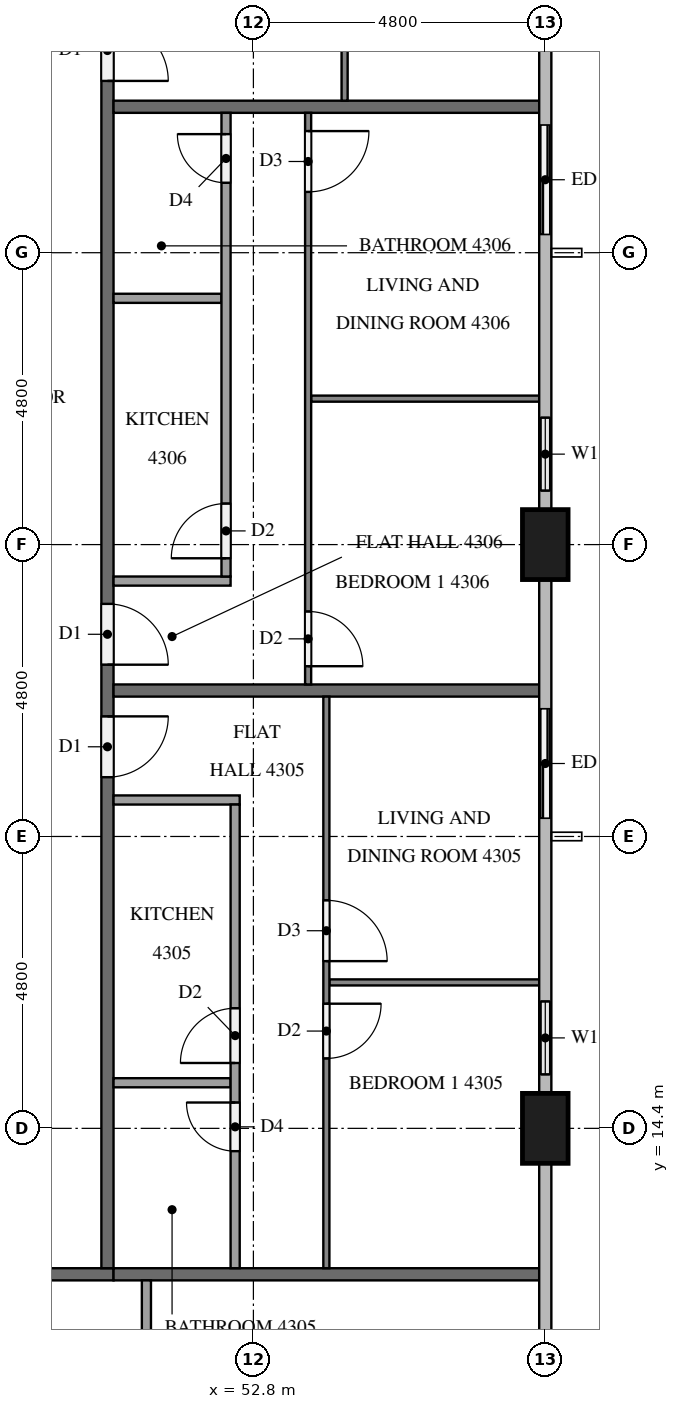
"""IFC4 building model, lengths in metres.
Left out: names, types, materials, properties, quantities, classifications, styles, units other than length and angle.
Written with IfcOpenShell. Run it as: python <this file> out.ifc"""

import sys

from ifc_helpers import new_model, si_unit, direction, frame, frame_2d, origin, origin_2d, place, context, subcontext, project, spatial, rectangle, extrude, element, fill, save


model = new_model("IFC4")
c1 = context("Model", 3, precision=1e-05, world=origin(), true_north=direction((0.0, 1.0)))
c2 = subcontext(c1, "Body", "Model", "MODEL_VIEW")
j1 = project(units=[si_unit("LENGTHUNIT", "METRE"), si_unit("PLANEANGLEUNIT", "RADIAN")], contexts=[c1])
p1 = place(None, origin())
s1 = spatial("IfcSite", under=j1, at=p1, CompositionType="ELEMENT")
p2 = place(p1, origin())
s2 = spatial("IfcBuilding", under=s1, at=p2, CompositionType="ELEMENT")
p3 = place(p2, frame((0.0, 0.0, 166.5)))
s3 = spatial("IfcBuildingStorey", under=s2, at=p3, CompositionType="ELEMENT", Elevation=166.5)
for number, where, z_axis, x_axis in (
    (1, (57.6, 14.4, 0.0), (0.0, 0.0, 1.0), (0.0, 1.0, 0.0)),
    (2, (57.6, 24.0, 0.0), (0.0, 0.0, 1.0), (0.0, 1.0, 0.0)),
):
    element("IfcColumn", number, at=place(p3, frame(where, z_axis=z_axis, x_axis=x_axis)), inside=s3, PredefinedType="COLUMN", context=c2, shape_type="SweptSolid", body=[
        extrude(rectangle(XDim=1.15, YDim=0.75, at=origin_2d()), origin(), (0.0, 0.0, 1.0), 3.2),
    ])
p4 = place(p3, frame((57.6, 14.975, 0.0), z_axis=(0.0, 0.0, 1.0), x_axis=(0.0, 1.0, 0.0)))
e3 = element("IfcWall", 3, at=p4, inside=s3, PredefinedType="SOLIDWALL", context=c2, shape_type="SweptSolid", body=[
    extrude(rectangle(XDim=1.825, YDim=0.15, at=frame_2d((0.913, 0.0))), origin(), (0.0, 0.0, 1.0), 3.2),
])
p5 = place(p4, frame((0.312, 0.0, 0.9)))
e4 = element("IfcOpeningElement", 4, at=p5, cuts=e3, PredefinedType="OPENING", context=c2, shape_type="SweptSolid", body=[
    extrude(rectangle(XDim=1.2, YDim=1.4, at=frame_2d((0.6, 0.7))), frame((0.0, 0.085, 0.0), z_axis=(0.0, -1.0, 0.0), x_axis=(1.0, 0.0, 0.0)), (0.0, 0.0, 1.0), 0.17),
])
p6 = place(p3, frame((57.6, 19.2, 0.0), z_axis=(0.0, 0.0, 1.0), x_axis=(0.0, 1.0, 0.0)))
e5 = element("IfcWall", 5, at=p6, inside=s3, PredefinedType="SOLIDWALL", context=c2, shape_type="SweptSolid", body=[
    extrude(rectangle(XDim=2.4, YDim=0.15, at=frame_2d((1.2, 0.0))), origin(), (0.0, 0.0, 1.0), 3.2),
])
p7 = place(p6, frame((0.3, 0.0, 0.0)))
e6 = element("IfcOpeningElement", 6, at=p7, cuts=e5, PredefinedType="OPENING", context=c2, shape_type="SweptSolid", body=[
    extrude(rectangle(XDim=1.8, YDim=2.4, at=frame_2d((0.9, 1.2))), frame((0.0, 0.085, 0.0), z_axis=(0.0, -1.0, 0.0), x_axis=(1.0, 0.0, 0.0)), (0.0, 0.0, 1.0), 0.17),
])
p8 = place(p3, frame((57.6, 24.575, 0.0), z_axis=(0.0, 0.0, 1.0), x_axis=(0.0, 1.0, 0.0)))
e7 = element("IfcWall", 7, at=p8, inside=s3, PredefinedType="SOLIDWALL", context=c2, shape_type="SweptSolid", body=[
    extrude(rectangle(XDim=1.825, YDim=0.15, at=frame_2d((0.913, 0.0))), origin(), (0.0, 0.0, 1.0), 3.2),
])
p9 = place(p8, frame((0.312, 0.0, 0.9)))
e8 = element("IfcOpeningElement", 8, at=p9, cuts=e7, PredefinedType="OPENING", context=c2, shape_type="SweptSolid", body=[
    extrude(rectangle(XDim=1.2, YDim=1.4, at=frame_2d((0.6, 0.7))), frame((0.0, 0.085, 0.0), z_axis=(0.0, -1.0, 0.0), x_axis=(1.0, 0.0, 0.0)), (0.0, 0.0, 1.0), 0.17),
])
p10 = place(p3, frame((57.6, 28.8, 0.0), z_axis=(0.0, 0.0, 1.0), x_axis=(0.0, 1.0, 0.0)))
e9 = element("IfcWall", 9, at=p10, inside=s3, PredefinedType="SOLIDWALL", context=c2, shape_type="SweptSolid", body=[
    extrude(rectangle(XDim=2.4, YDim=0.15, at=frame_2d((1.2, 0.0))), origin(), (0.0, 0.0, 1.0), 3.2),
])
p11 = place(p10, frame((0.3, 0.0, 0.0)))
e10 = element("IfcOpeningElement", 10, at=p11, cuts=e9, PredefinedType="OPENING", context=c2, shape_type="SweptSolid", body=[
    extrude(rectangle(XDim=1.8, YDim=2.4, at=frame_2d((0.9, 1.2))), frame((0.0, 0.085, 0.0), z_axis=(0.0, -1.0, 0.0), x_axis=(1.0, 0.0, 0.0)), (0.0, 0.0, 1.0), 0.17),
])
p12 = place(p3, frame((50.5, 12.0, 0.0), z_axis=(0.0, 0.0, 1.0), x_axis=(-1.0, 0.0, 0.0)))
e11 = element("IfcWall", 11, at=p12, inside=s3, PredefinedType="PARTITIONING", context=c2, shape_type="SweptSolid", body=[
    extrude(rectangle(XDim=38.6, YDim=0.2, at=frame_2d((19.3, 0.0))), origin(), (0.0, 0.0, 1.0), 3.2),
])
p13 = place(p12, frame((34.125, 0.0, 0.0)))
e12 = element("IfcOpeningElement", 12, at=p13, cuts=e11, PredefinedType="OPENING", context=c2, shape_type="SweptSolid", body=[
    extrude(rectangle(XDim=1.0, YDim=2.1, at=frame_2d((0.5, 1.05))), frame((0.0, 0.11, 0.0), z_axis=(0.0, -1.0, 0.0), x_axis=(1.0, 0.0, 0.0)), (0.0, 0.0, 1.0), 0.22),
])
p14 = place(p12, frame((32.275, 0.0, 0.0)))
e13 = element("IfcOpeningElement", 13, at=p14, cuts=e11, PredefinedType="OPENING", context=c2, shape_type="SweptSolid", body=[
    extrude(rectangle(XDim=1.0, YDim=2.1, at=frame_2d((0.5, 1.05))), frame((0.0, 0.11, 0.0), z_axis=(0.0, -1.0, 0.0), x_axis=(1.0, 0.0, 0.0)), (0.0, 0.0, 1.0), 0.22),
])
p15 = place(p12, frame((12.525, 0.0, 0.0)))
e14 = element("IfcOpeningElement", 14, at=p15, cuts=e11, PredefinedType="OPENING", context=c2, shape_type="SweptSolid", body=[
    extrude(rectangle(XDim=1.0, YDim=2.1, at=frame_2d((0.5, 1.05))), frame((0.0, 0.11, 0.0), z_axis=(0.0, -1.0, 0.0), x_axis=(1.0, 0.0, 0.0)), (0.0, 0.0, 1.0), 0.22),
])
p16 = place(p12, frame((10.625, 0.0, 0.0)))
e15 = element("IfcOpeningElement", 15, at=p16, cuts=e11, PredefinedType="OPENING", context=c2, shape_type="SweptSolid", body=[
    extrude(rectangle(XDim=1.1, YDim=2.1, at=frame_2d((0.55, 1.05))), frame((0.0, 0.11, 0.0), z_axis=(0.0, -1.0, 0.0), x_axis=(1.0, 0.0, 0.0)), (0.0, 0.0, 1.0), 0.22),
])
p17 = place(p3, frame((50.4, 40.7, 0.0), z_axis=(0.0, 0.0, 1.0), x_axis=(0.0, -1.0, 0.0)))
e16 = element("IfcWall", 16, at=p17, inside=s3, PredefinedType="PARTITIONING", context=c2, shape_type="SweptSolid", body=[
    extrude(rectangle(XDim=28.6, YDim=0.2, at=frame_2d((14.3, 0.0))), origin(), (0.0, 0.0, 1.0), 3.2),
])
p18 = place(p17, frame((19.525, 0.0, 0.0)))
e17 = element("IfcOpeningElement", 17, at=p18, cuts=e16, PredefinedType="OPENING", context=c2, shape_type="SweptSolid", body=[
    extrude(rectangle(XDim=1.0, YDim=2.1, at=frame_2d((0.5, 1.05))), frame((0.0, 0.11, 0.0), z_axis=(0.0, -1.0, 0.0), x_axis=(1.0, 0.0, 0.0)), (0.0, 0.0, 1.0), 0.22),
])
p19 = place(p17, frame((17.675, 0.0, 0.0)))
e18 = element("IfcOpeningElement", 18, at=p19, cuts=e16, PredefinedType="OPENING", context=c2, shape_type="SweptSolid", body=[
    extrude(rectangle(XDim=1.0, YDim=2.1, at=frame_2d((0.5, 1.05))), frame((0.0, 0.11, 0.0), z_axis=(0.0, -1.0, 0.0), x_axis=(1.0, 0.0, 0.0)), (0.0, 0.0, 1.0), 0.22),
])
p20 = place(p17, frame((8.075, 0.0, 0.0)))
e19 = element("IfcOpeningElement", 19, at=p20, cuts=e16, PredefinedType="OPENING", context=c2, shape_type="SweptSolid", body=[
    extrude(rectangle(XDim=1.0, YDim=2.1, at=frame_2d((0.5, 1.05))), frame((0.0, 0.11, 0.0), z_axis=(0.0, -1.0, 0.0), x_axis=(1.0, 0.0, 0.0)), (0.0, 0.0, 1.0), 0.22),
])
for number, where, z_axis, x_axis in (
    (20, (50.5, 12.0, 0.0), (0.0, 0.0, 1.0), (1.0, 0.0, 0.0)),
    (21, (50.5, 21.6, 0.0), (0.0, 0.0, 1.0), (1.0, 0.0, 0.0)),
    (22, (50.5, 31.2, 0.0), (0.0, 0.0, 1.0), (1.0, 0.0, 0.0)),
):
    element("IfcWall", number, at=place(p3, frame(where, z_axis=z_axis, x_axis=x_axis)), inside=s3, PredefinedType="PARTITIONING", context=c2, shape_type="SweptSolid", body=[
        extrude(rectangle(XDim=7.0, YDim=0.2, at=frame_2d((3.5, 0.0))), origin(), (0.0, 0.0, 1.0), 3.2),
    ])
p21 = place(p3, frame((51.041, 11.9, 0.0), z_axis=(0.0, 0.0, 1.0), x_axis=(0.0, -1.0, 0.0)))
e23 = element("IfcWall", 23, at=p21, inside=s3, PredefinedType="PARTITIONING", context=c2, shape_type="SweptSolid", body=[
    extrude(rectangle(XDim=4.175, YDim=0.15, at=frame_2d((2.087, 0.0))), origin(), (0.0, 0.0, 1.0), 3.2),
])
p22 = place(p3, frame((54.05, 16.8, 0.0), z_axis=(0.0, 0.0, 1.0), x_axis=(1.0, 0.0, 0.0)))
e24 = element("IfcWall", 24, at=p22, inside=s3, PredefinedType="PARTITIONING", context=c2, shape_type="SweptSolid", body=[
    extrude(rectangle(XDim=3.45, YDim=0.1, at=frame_2d((1.725, 0.0))), origin(), (0.0, 0.0, 1.0), 3.2),
])
p23 = place(p3, frame((54.0, 21.5, 0.0), z_axis=(0.0, 0.0, 1.0), x_axis=(0.0, -1.0, 0.0)))
e25 = element("IfcWall", 25, at=p23, inside=s3, PredefinedType="PARTITIONING", context=c2, shape_type="SweptSolid", body=[
    extrude(rectangle(XDim=9.4, YDim=0.1, at=frame_2d((4.7, 0.0))), origin(), (0.0, 0.0, 1.0), 3.2),
])
p24 = place(p23, frame((3.35, 0.0, 0.0)))
e26 = element("IfcOpeningElement", 26, at=p24, cuts=e25, PredefinedType="OPENING", context=c2, shape_type="SweptSolid", body=[
    extrude(rectangle(XDim=1.0, YDim=2.1, at=frame_2d((0.5, 1.05))), frame((0.0, 0.06, 0.0), z_axis=(0.0, -1.0, 0.0), x_axis=(1.0, 0.0, 0.0)), (0.0, 0.0, 1.0), 0.12),
])
p25 = place(p23, frame((5.05, 0.0, 0.0)))
e27 = element("IfcOpeningElement", 27, at=p25, cuts=e25, PredefinedType="OPENING", context=c2, shape_type="SweptSolid", body=[
    extrude(rectangle(XDim=0.9, YDim=2.1, at=frame_2d((0.45, 1.05))), frame((0.0, 0.06, 0.0), z_axis=(0.0, -1.0, 0.0), x_axis=(1.0, 0.0, 0.0)), (0.0, 0.0, 1.0), 0.12),
])
p26 = place(p3, frame((50.5, 15.15, 0.0), z_axis=(0.0, 0.0, 1.0), x_axis=(1.0, 0.0, 0.0)))
e28 = element("IfcWall", 28, at=p26, inside=s3, PredefinedType="PARTITIONING", context=c2, shape_type="SweptSolid", body=[
    extrude(rectangle(XDim=1.925, YDim=0.15, at=frame_2d((0.962, 0.0))), origin(), (0.0, 0.0, 1.0), 3.2),
])
p27 = place(p3, frame((50.5, 19.8, 0.0), z_axis=(0.0, 0.0, 1.0), x_axis=(1.0, 0.0, 0.0)))
e29 = element("IfcWall", 29, at=p27, inside=s3, PredefinedType="PARTITIONING", context=c2, shape_type="SweptSolid", body=[
    extrude(rectangle(XDim=2.075, YDim=0.15, at=frame_2d((1.038, 0.0))), origin(), (0.0, 0.0, 1.0), 3.2),
])
p28 = place(p3, frame((52.5, 12.1, 0.0), z_axis=(0.0, 0.0, 1.0), x_axis=(0.0, 1.0, 0.0)))
e30 = element("IfcWall", 30, at=p28, inside=s3, PredefinedType="PARTITIONING", context=c2, shape_type="SweptSolid", body=[
    extrude(rectangle(XDim=7.625, YDim=0.15, at=frame_2d((3.812, 0.0))), origin(), (0.0, 0.0, 1.0), 3.2),
])
p29 = place(p28, frame((3.375, 0.0, 0.0)))
e31 = element("IfcOpeningElement", 31, at=p29, cuts=e30, PredefinedType="OPENING", context=c2, shape_type="SweptSolid", body=[
    extrude(rectangle(XDim=0.9, YDim=2.1, at=frame_2d((0.45, 1.05))), frame((0.0, 0.085, 0.0), z_axis=(0.0, -1.0, 0.0), x_axis=(1.0, 0.0, 0.0)), (0.0, 0.0, 1.0), 0.17),
])
p30 = place(p28, frame((1.925, 0.0, 0.0)))
e32 = element("IfcOpeningElement", 32, at=p30, cuts=e30, PredefinedType="OPENING", context=c2, shape_type="SweptSolid", body=[
    extrude(rectangle(XDim=0.8, YDim=2.1, at=frame_2d((0.4, 1.05))), frame((0.0, 0.085, 0.0), z_axis=(0.0, -1.0, 0.0), x_axis=(1.0, 0.0, 0.0)), (0.0, 0.0, 1.0), 0.17),
])
p31 = place(p3, frame((53.75, 26.4, 0.0), z_axis=(0.0, 0.0, 1.0), x_axis=(1.0, 0.0, 0.0)))
e33 = element("IfcWall", 33, at=p31, inside=s3, PredefinedType="PARTITIONING", context=c2, shape_type="SweptSolid", body=[
    extrude(rectangle(XDim=3.75, YDim=0.1, at=frame_2d((1.875, 0.0))), origin(), (0.0, 0.0, 1.0), 3.2),
])
p32 = place(p3, frame((53.7, 31.1, 0.0), z_axis=(0.0, 0.0, 1.0), x_axis=(0.0, -1.0, 0.0)))
e34 = element("IfcWall", 34, at=p32, inside=s3, PredefinedType="PARTITIONING", context=c2, shape_type="SweptSolid", body=[
    extrude(rectangle(XDim=9.4, YDim=0.1, at=frame_2d((4.7, 0.0))), origin(), (0.0, 0.0, 1.0), 3.2),
])
p33 = place(p32, frame((8.2, 0.0, 0.0)))
e35 = element("IfcOpeningElement", 35, at=p33, cuts=e34, PredefinedType="OPENING", context=c2, shape_type="SweptSolid", body=[
    extrude(rectangle(XDim=0.9, YDim=2.1, at=frame_2d((0.45, 1.05))), frame((0.0, 0.06, 0.0), z_axis=(0.0, -1.0, 0.0), x_axis=(1.0, 0.0, 0.0)), (0.0, 0.0, 1.0), 0.12),
])
p34 = place(p32, frame((0.3, 0.0, 0.0)))
e36 = element("IfcOpeningElement", 36, at=p34, cuts=e34, PredefinedType="OPENING", context=c2, shape_type="SweptSolid", body=[
    extrude(rectangle(XDim=1.0, YDim=2.1, at=frame_2d((0.5, 1.05))), frame((0.0, 0.06, 0.0), z_axis=(0.0, -1.0, 0.0), x_axis=(1.0, 0.0, 0.0)), (0.0, 0.0, 1.0), 0.12),
])
p35 = place(p3, frame((50.5, 28.05, 0.0), z_axis=(0.0, 0.0, 1.0), x_axis=(1.0, 0.0, 0.0)))
e37 = element("IfcWall", 37, at=p35, inside=s3, PredefinedType="PARTITIONING", context=c2, shape_type="SweptSolid", body=[
    extrude(rectangle(XDim=1.775, YDim=0.15, at=frame_2d((0.887, 0.0))), origin(), (0.0, 0.0, 1.0), 3.2),
])
p36 = place(p3, frame((50.5, 23.4, 0.0), z_axis=(0.0, 0.0, 1.0), x_axis=(1.0, 0.0, 0.0)))
e38 = element("IfcWall", 38, at=p36, inside=s3, PredefinedType="PARTITIONING", context=c2, shape_type="SweptSolid", body=[
    extrude(rectangle(XDim=1.925, YDim=0.15, at=frame_2d((0.962, 0.0))), origin(), (0.0, 0.0, 1.0), 3.2),
])
p37 = place(p3, frame((52.35, 23.475, 0.0), z_axis=(0.0, 0.0, 1.0), x_axis=(0.0, 1.0, 0.0)))
e39 = element("IfcWall", 39, at=p37, inside=s3, PredefinedType="PARTITIONING", context=c2, shape_type="SweptSolid", body=[
    extrude(rectangle(XDim=7.625, YDim=0.15, at=frame_2d((3.812, 0.0))), origin(), (0.0, 0.0, 1.0), 3.2),
])
p38 = place(p37, frame((0.3, 0.0, 0.0)))
e40 = element("IfcOpeningElement", 40, at=p38, cuts=e39, PredefinedType="OPENING", context=c2, shape_type="SweptSolid", body=[
    extrude(rectangle(XDim=0.9, YDim=2.1, at=frame_2d((0.45, 1.05))), frame((0.0, 0.085, 0.0), z_axis=(0.0, -1.0, 0.0), x_axis=(1.0, 0.0, 0.0)), (0.0, 0.0, 1.0), 0.17),
])
p39 = place(p37, frame((6.475, 0.0, 0.0)))
e41 = element("IfcOpeningElement", 41, at=p39, cuts=e39, PredefinedType="OPENING", context=c2, shape_type="SweptSolid", body=[
    extrude(rectangle(XDim=0.8, YDim=2.1, at=frame_2d((0.4, 1.05))), frame((0.0, 0.085, 0.0), z_axis=(0.0, -1.0, 0.0), x_axis=(1.0, 0.0, 0.0)), (0.0, 0.0, 1.0), 0.17),
])
p40 = place(p3, frame((54.3, 47.498, 0.0), z_axis=(0.0, 0.0, 1.0), x_axis=(0.0, -1.0, 0.0)))
e42 = element("IfcWall", 42, at=p40, inside=s3, PredefinedType="PARTITIONING", context=c2, shape_type="SweptSolid", body=[
    extrude(rectangle(XDim=16.198, YDim=0.1, at=frame_2d((8.099, 0.0))), origin(), (0.0, 0.0, 1.0), 3.2),
])
p41 = place(p40, frame((11.848, 0.0, 0.0)))
e43 = element("IfcOpeningElement", 43, at=p41, cuts=e42, PredefinedType="OPENING", context=c2, shape_type="SweptSolid", body=[
    extrude(rectangle(XDim=0.9, YDim=2.1, at=frame_2d((0.45, 1.05))), frame((0.0, 0.06, 0.0), z_axis=(0.0, -1.0, 0.0), x_axis=(1.0, 0.0, 0.0)), (0.0, 0.0, 1.0), 0.12),
])
p42 = place(p40, frame((10.248, 0.0, 0.0)))
e44 = element("IfcOpeningElement", 44, at=p42, cuts=e42, PredefinedType="OPENING", context=c2, shape_type="SweptSolid", body=[
    extrude(rectangle(XDim=0.9, YDim=2.1, at=frame_2d((0.45, 1.05))), frame((0.0, 0.06, 0.0), z_axis=(0.0, -1.0, 0.0), x_axis=(1.0, 0.0, 0.0)), (0.0, 0.0, 1.0), 0.12),
])
p43 = place(p40, frame((0.3, 0.0, 0.0)))
e45 = element("IfcOpeningElement", 45, at=p43, cuts=e42, PredefinedType="OPENING", context=c2, shape_type="SweptSolid", body=[
    extrude(rectangle(XDim=1.0, YDim=2.1, at=frame_2d((0.5, 1.05))), frame((0.0, 0.06, 0.0), z_axis=(0.0, -1.0, 0.0), x_axis=(1.0, 0.0, 0.0)), (0.0, 0.0, 1.0), 0.12),
])
p44 = place(p5, origin())
e46 = element("IfcWindow", 46, at=p44, inside=s3, PartitioningType="SINGLE_PANEL", PredefinedType="WINDOW", context=c2, shape_type="SweptSolid", body=[
    extrude(rectangle(XDim=1.2, YDim=1.4, at=frame_2d((0.6, 0.7))), frame((0.0, 0.03, 0.0), z_axis=(0.0, -1.0, 0.0), x_axis=(1.0, 0.0, 0.0)), (0.0, 0.0, 1.0), 0.06),
])
fill(e4, e46)
p45 = place(p7, origin())
e47 = element("IfcDoor", 47, at=p45, inside=s3, OperationType="SLIDING_TO_LEFT", PredefinedType="DOOR", context=c2, shape_type="SweptSolid", body=[
    extrude(rectangle(XDim=1.8, YDim=2.4, at=frame_2d((0.9, 1.2))), frame((0.0, 0.025, 0.0), z_axis=(0.0, -1.0, 0.0), x_axis=(1.0, 0.0, 0.0)), (0.0, 0.0, 1.0), 0.05),
])
fill(e6, e47)
p46 = place(p9, origin())
e48 = element("IfcWindow", 48, at=p46, inside=s3, PartitioningType="SINGLE_PANEL", PredefinedType="WINDOW", context=c2, shape_type="SweptSolid", body=[
    extrude(rectangle(XDim=1.2, YDim=1.4, at=frame_2d((0.6, 0.7))), frame((0.0, 0.03, 0.0), z_axis=(0.0, -1.0, 0.0), x_axis=(1.0, 0.0, 0.0)), (0.0, 0.0, 1.0), 0.06),
])
fill(e8, e48)
p47 = place(p11, origin())
e49 = element("IfcDoor", 49, at=p47, inside=s3, OperationType="SLIDING_TO_RIGHT", PredefinedType="DOOR", context=c2, shape_type="SweptSolid", body=[
    extrude(rectangle(XDim=1.8, YDim=2.4, at=frame_2d((0.9, 1.2))), frame((0.0, 0.025, 0.0), z_axis=(0.0, -1.0, 0.0), x_axis=(1.0, 0.0, 0.0)), (0.0, 0.0, 1.0), 0.05),
])
fill(e10, e49)
p48 = place(p18, origin())
e50 = element("IfcDoor", 50, at=p48, inside=s3, OperationType="SINGLE_SWING_LEFT", PredefinedType="DOOR", context=c2, shape_type="SweptSolid", body=[
    extrude(rectangle(XDim=1.0, YDim=2.1, at=frame_2d((0.5, 1.05))), frame((0.0, 0.025, 0.0), z_axis=(0.0, -1.0, 0.0), x_axis=(1.0, 0.0, 0.0)), (0.0, 0.0, 1.0), 0.05),
])
fill(e17, e50)
p49 = place(p19, origin())
e51 = element("IfcDoor", 51, at=p49, inside=s3, OperationType="SINGLE_SWING_RIGHT", PredefinedType="DOOR", context=c2, shape_type="SweptSolid", body=[
    extrude(rectangle(XDim=1.0, YDim=2.1, at=frame_2d((0.5, 1.05))), frame((0.0, 0.025, 0.0), z_axis=(0.0, -1.0, 0.0), x_axis=(1.0, 0.0, 0.0)), (0.0, 0.0, 1.0), 0.05),
])
fill(e18, e51)
p50 = place(p20, origin())
e52 = element("IfcDoor", 52, at=p50, inside=s3, OperationType="SINGLE_SWING_RIGHT", PredefinedType="DOOR", context=c2, shape_type="SweptSolid", body=[
    extrude(rectangle(XDim=1.0, YDim=2.1, at=frame_2d((0.5, 1.05))), frame((0.0, 0.025, 0.0), z_axis=(0.0, -1.0, 0.0), x_axis=(1.0, 0.0, 0.0)), (0.0, 0.0, 1.0), 0.05),
])
fill(e19, e52)
p51 = place(p24, origin())
e53 = element("IfcDoor", 53, at=p51, inside=s3, OperationType="SINGLE_SWING_RIGHT", PredefinedType="DOOR", context=c2, shape_type="SweptSolid", body=[
    extrude(rectangle(XDim=1.0, YDim=2.1, at=frame_2d((0.5, 1.05))), frame((0.0, 0.025, 0.0), z_axis=(0.0, -1.0, 0.0), x_axis=(1.0, 0.0, 0.0)), (0.0, 0.0, 1.0), 0.05),
])
fill(e26, e53)
p52 = place(p25, origin())
e54 = element("IfcDoor", 54, at=p52, inside=s3, OperationType="SINGLE_SWING_LEFT", PredefinedType="DOOR", context=c2, shape_type="SweptSolid", body=[
    extrude(rectangle(XDim=0.9, YDim=2.1, at=frame_2d((0.45, 1.05))), frame((0.0, 0.025, 0.0), z_axis=(0.0, -1.0, 0.0), x_axis=(1.0, 0.0, 0.0)), (0.0, 0.0, 1.0), 0.05),
])
fill(e27, e54)
p53 = place(p29, origin())
e55 = element("IfcDoor", 55, at=p53, inside=s3, OperationType="SINGLE_SWING_LEFT", PredefinedType="DOOR", context=c2, shape_type="SweptSolid", body=[
    extrude(rectangle(XDim=0.9, YDim=2.1, at=frame_2d((0.45, 1.05))), frame((0.0, 0.025, 0.0), z_axis=(0.0, -1.0, 0.0), x_axis=(1.0, 0.0, 0.0)), (0.0, 0.0, 1.0), 0.05),
])
fill(e31, e55)
p54 = place(p30, origin())
e56 = element("IfcDoor", 56, at=p54, inside=s3, OperationType="SINGLE_SWING_RIGHT", PredefinedType="DOOR", context=c2, shape_type="SweptSolid", body=[
    extrude(rectangle(XDim=0.8, YDim=2.1, at=frame_2d((0.4, 1.05))), frame((0.0, 0.025, 0.0), z_axis=(0.0, -1.0, 0.0), x_axis=(1.0, 0.0, 0.0)), (0.0, 0.0, 1.0), 0.05),
])
fill(e32, e56)
p55 = place(p33, origin())
e57 = element("IfcDoor", 57, at=p55, inside=s3, OperationType="SINGLE_SWING_RIGHT", PredefinedType="DOOR", context=c2, shape_type="SweptSolid", body=[
    extrude(rectangle(XDim=0.9, YDim=2.1, at=frame_2d((0.45, 1.05))), frame((0.0, 0.025, 0.0), z_axis=(0.0, -1.0, 0.0), x_axis=(1.0, 0.0, 0.0)), (0.0, 0.0, 1.0), 0.05),
])
fill(e35, e57)
p56 = place(p34, origin())
e58 = element("IfcDoor", 58, at=p56, inside=s3, OperationType="SINGLE_SWING_LEFT", PredefinedType="DOOR", context=c2, shape_type="SweptSolid", body=[
    extrude(rectangle(XDim=1.0, YDim=2.1, at=frame_2d((0.5, 1.05))), frame((0.0, 0.025, 0.0), z_axis=(0.0, -1.0, 0.0), x_axis=(1.0, 0.0, 0.0)), (0.0, 0.0, 1.0), 0.05),
])
fill(e36, e58)
p57 = place(p38, origin())
e59 = element("IfcDoor", 59, at=p57, inside=s3, OperationType="SINGLE_SWING_LEFT", PredefinedType="DOOR", context=c2, shape_type="SweptSolid", body=[
    extrude(rectangle(XDim=0.9, YDim=2.1, at=frame_2d((0.45, 1.05))), frame((0.0, 0.025, 0.0), z_axis=(0.0, -1.0, 0.0), x_axis=(1.0, 0.0, 0.0)), (0.0, 0.0, 1.0), 0.05),
])
fill(e40, e59)
p58 = place(p39, origin())
e60 = element("IfcDoor", 60, at=p58, inside=s3, OperationType="SINGLE_SWING_RIGHT", PredefinedType="DOOR", context=c2, shape_type="SweptSolid", body=[
    extrude(rectangle(XDim=0.8, YDim=2.1, at=frame_2d((0.4, 1.05))), frame((0.0, 0.025, 0.0), z_axis=(0.0, -1.0, 0.0), x_axis=(1.0, 0.0, 0.0)), (0.0, 0.0, 1.0), 0.05),
])
fill(e41, e60)
save(model, sys.argv[1])
